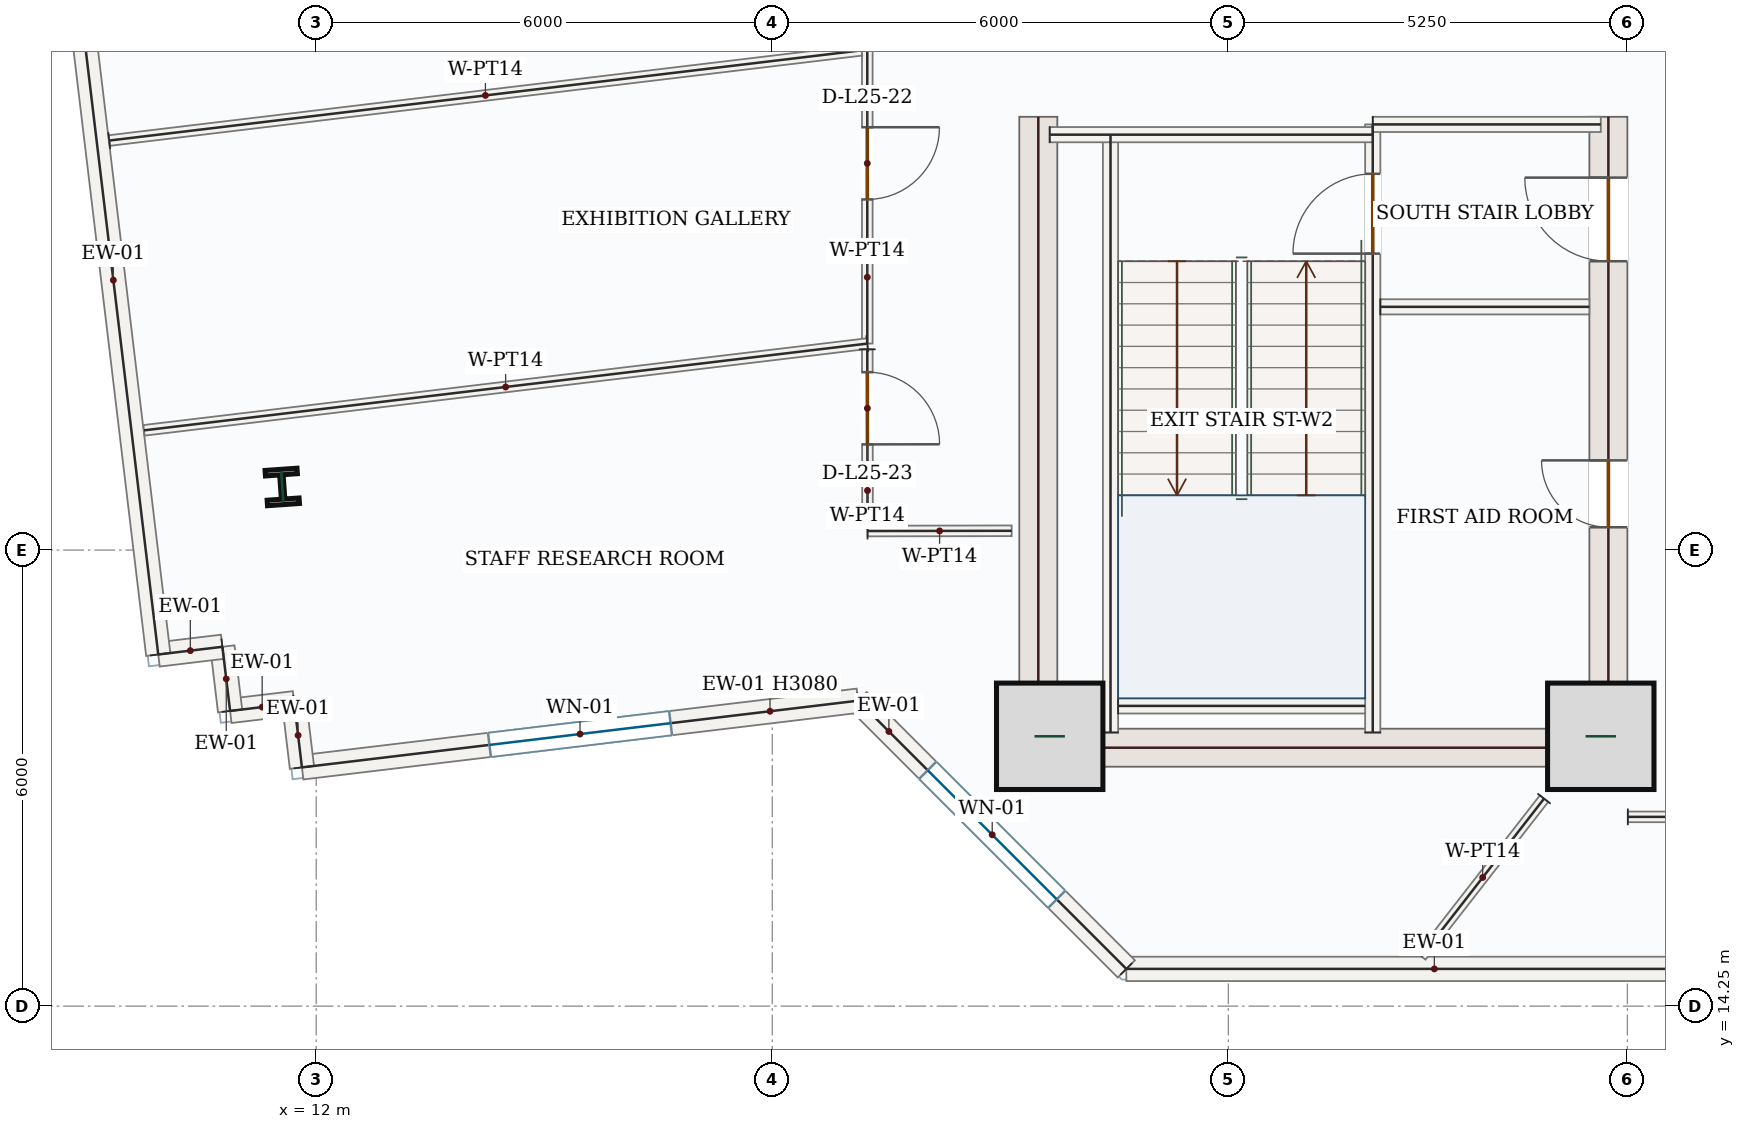
"""IFC4 building model, lengths in metres.
Left out: names, types, materials, properties, quantities, classifications, styles, units other than length and angle.
Written with IfcOpenShell. Run it as: python <this file> out.ifc"""

import sys

from ifc_helpers import new_model, si_unit, direction, frame, frame_2d, origin, origin_2d, place, context, subcontext, project, spatial, rectangle, i_section, extrude, source, transform, mapped, element, fill, save


model = new_model("IFC4")
c1 = context("Model", 3, precision=1e-05, world=origin(), true_north=direction((0.0, 1.0)))
c2 = subcontext(c1, "Body", "Model", "MODEL_VIEW")
j1 = project(units=[si_unit("LENGTHUNIT", "METRE"), si_unit("PLANEANGLEUNIT", "RADIAN")], contexts=[c1])
p1 = place(None, origin())
s1 = spatial("IfcSite", under=j1, at=p1, CompositionType="ELEMENT")
p2 = place(p1, origin())
s2 = spatial("IfcBuilding", under=s1, at=p2, CompositionType="ELEMENT")
p3 = place(p2, frame((0.0, 0.0, 113.1)))
s3 = spatial("IfcBuildingStorey", under=s2, at=p3, CompositionType="ELEMENT", Elevation=113.1)
m1 = source(origin(), c2, "Body", "SweptSolid", [
    extrude(rectangle(XDim=8.55, YDim=0.5, at=frame_2d((4.275, 0.0))), origin(), (0.0, 0.0, 1.0), 3.95),
])
p4 = place(p3, frame((21.5, 17.4, 0.0), z_axis=(0.0, 0.0, 1.0), x_axis=(0.0, 1.0, 0.0)))
e1 = element("IfcWall", 1, at=p4, inside=s3, PredefinedType="SHEAR", context=c2, shape_type="MappedRepresentation", body=[
    mapped(m1, transform((0.0, 0.0, 0.0), x_axis=(1.0, 0.0, 0.0), y_axis=(0.0, 1.0, 0.0), z_axis=(0.0, 0.0, 1.0), scale=1.0)),
])
p5 = place(p3, frame((29.0, 17.4, 0.0), z_axis=(0.0, 0.0, 1.0), x_axis=(0.0, 1.0, 0.0)))
e2 = element("IfcWall", 2, at=p5, inside=s3, PredefinedType="SHEAR", context=c2, shape_type="SweptSolid", body=[
    extrude(rectangle(XDim=8.55, YDim=0.5, at=frame_2d((4.275, 0.0))), origin(), (0.0, 0.0, 1.0), 3.95),
])
p6 = place(p5, frame((6.65, 0.0, 0.0)))
e3 = element("IfcOpeningElement", 3, at=p6, cuts=e2, PredefinedType="OPENING", context=c2, shape_type="SweptSolid", body=[
    extrude(rectangle(XDim=1.1, YDim=2.2, at=frame_2d((0.55, 1.1))), frame((0.0, 0.26, 0.0), z_axis=(0.0, -1.0, 0.0), x_axis=(1.0, 0.0, 0.0)), (0.0, 0.0, 1.0), 0.52),
])
p7 = place(p5, frame((3.15, 0.0, 0.0)))
e4 = element("IfcOpeningElement", 4, at=p7, cuts=e2, PredefinedType="OPENING", context=c2, shape_type="SweptSolid", body=[
    extrude(rectangle(XDim=0.88, YDim=2.1, at=frame_2d((0.44, 1.05))), frame((0.0, 0.26, 0.0), z_axis=(0.0, -1.0, 0.0), x_axis=(1.0, 0.0, 0.0)), (0.0, 0.0, 1.0), 0.52),
])
m2 = source(origin(), c2, "Body", "SweptSolid", [
    extrude(rectangle(XDim=7.0, YDim=0.5, at=frame_2d((3.5, 0.0))), origin(), (0.0, 0.0, 1.0), 3.95),
])
p8 = place(p3, frame((21.75, 17.65, 0.0), z_axis=(0.0, 0.0, 1.0), x_axis=(1.0, 0.0, 0.0)))
e5 = element("IfcWall", 5, at=p8, inside=s3, PredefinedType="SHEAR", context=c2, shape_type="MappedRepresentation", body=[
    mapped(m2, transform((0.0, 0.0, 0.0), x_axis=(1.0, 0.0, 0.0), y_axis=(0.0, 1.0, 0.0), z_axis=(0.0, 0.0, 1.0), scale=1.0)),
])
m3 = source(origin(), c2, "Body", "SweptSolid", [
    extrude(rectangle(XDim=1.4, YDim=1.4, at=origin_2d()), origin(), (0.0, 0.0, 1.0), 4.2),
])
for number, where, z_axis, x_axis in (
    (6, (21.65, 17.8, 0.0), (0.0, 0.0, 1.0), (1.0, 0.0, 0.0)),
    (7, (28.9, 17.8, 0.0), (0.0, 0.0, 1.0), (1.0, 0.0, 0.0)),
):
    element("IfcColumn", number, at=place(p3, frame(where, z_axis=z_axis, x_axis=x_axis)), inside=s3, PredefinedType="COLUMN", context=c2, shape_type="MappedRepresentation", body=[
        mapped(m3, transform((0.0, 0.0, 0.0), x_axis=(1.0, 0.0, 0.0), y_axis=(0.0, 1.0, 0.0), z_axis=(0.0, 0.0, 1.0), scale=1.0)),
    ])
m4 = source(origin(), c2, "Body", "SweptSolid", [
    extrude(i_section(OverallWidth=0.421, OverallDepth=0.465, WebThickness=0.045, FlangeThickness=0.073, FilletRadius=0.018, at=origin_2d()), origin(), (0.0, 0.0, 1.0), 4.2),
])
p9 = place(p3, frame((11.553, 21.08, 0.0), z_axis=(0.0, 0.0, 1.0), x_axis=(0.99756405026, 0.069756473744, 0.0)))
e8 = element("IfcColumn", 8, at=p9, inside=s3, PredefinedType="COLUMN", context=c2, shape_type="MappedRepresentation", body=[
    mapped(m4, transform((0.0, 0.0, 0.0), x_axis=(1.0, 0.0, 0.0), y_axis=(0.0, 1.0, 0.0), z_axis=(0.0, 0.0, 1.0), scale=1.0)),
])
m5 = source(origin(), c2, "Body", "SweptSolid", [
    extrude(rectangle(XDim=8.105, YDim=0.32, at=frame_2d((4.052, 0.0))), origin(), (0.0, 0.0, 1.0), 3.95),
])
p10 = place(p3, frame((30.763, 14.74, 0.0), z_axis=(0.0, 0.0, 1.0), x_axis=(-1.0, 0.0, 0.0)))
e9 = element("IfcWall", 9, at=p10, inside=s3, PredefinedType="SOLIDWALL", context=c2, shape_type="MappedRepresentation", body=[
    mapped(m5, transform((0.0, 0.0, 0.0), x_axis=(1.0, 0.0, 0.0), y_axis=(0.0, 1.0, 0.0), z_axis=(0.0, 0.0, 1.0), scale=1.0)),
])
p11 = place(p3, frame((22.658, 14.74, 0.0), z_axis=(0.0, 0.0, 1.0), x_axis=(-0.707106781187, 0.707106781187, 0.0)))
e10 = element("IfcWall", 10, at=p11, inside=s3, PredefinedType="SOLIDWALL", context=c2, shape_type="SweptSolid", body=[
    extrude(rectangle(XDim=4.99, YDim=0.32, at=frame_2d((2.495, 0.0))), origin(), (0.0, 0.0, 1.0), 3.95),
])
p12 = place(p11, frame((1.295, 0.0, 0.85)))
e11 = element("IfcOpeningElement", 11, at=p12, cuts=e10, PredefinedType="OPENING", context=c2, shape_type="SweptSolid", body=[
    extrude(rectangle(XDim=2.4, YDim=1.8, at=frame_2d((1.2, 0.9))), frame((0.0, 0.17, 0.0), z_axis=(0.0, -1.0, 0.0), x_axis=(1.0, 0.0, 0.0)), (0.0, 0.0, 1.0), 0.34),
])
p13 = place(p3, frame((19.129, 18.269, 0.0), z_axis=(0.0, 0.0, 1.0), x_axis=(-0.992882794037, -0.119095580547, 0.0)))
e12 = element("IfcWall", 12, at=p13, inside=s3, PredefinedType="SOLIDWALL", context=c2, shape_type="SweptSolid", body=[
    extrude(rectangle(XDim=7.37, YDim=0.32, at=frame_2d((3.685, 0.0))), origin(), (0.0, 0.0, 1.0), 3.08),
])
p14 = place(p13, frame((2.485, 0.0, 0.85)))
e13 = element("IfcOpeningElement", 13, at=p14, cuts=e12, PredefinedType="OPENING", context=c2, shape_type="SweptSolid", body=[
    extrude(rectangle(XDim=2.4, YDim=1.8, at=frame_2d((1.2, 0.9))), frame((0.0, 0.17, 0.0), z_axis=(0.0, -1.0, 0.0), x_axis=(1.0, 0.0, 0.0)), (0.0, 0.0, 1.0), 0.34),
])
m6 = source(origin(), c2, "Body", "SweptSolid", [
    extrude(rectangle(XDim=0.85, YDim=0.32, at=frame_2d((0.425, 0.0))), origin(), (0.0, 0.0, 1.0), 3.95),
])
for number, where, z_axis, x_axis in (
    (14, (11.812, 17.391, 0.0), (0.0, 0.0, 1.0), (-0.119, 0.993, 0.0)),
    (15, (11.711, 18.235, 0.0), (0.0, 0.0, 1.0), (-0.993, -0.119, 0.0)),
):
    element("IfcWall", number, at=place(p3, frame(where, z_axis=z_axis, x_axis=x_axis)), inside=s3, PredefinedType="SOLIDWALL", context=c2, shape_type="MappedRepresentation", body=[
        mapped(m6, transform((0.0, 0.0, 0.0), x_axis=(1.0, 0.0, 0.0), y_axis=(0.0, 1.0, 0.0), z_axis=(0.0, 0.0, 1.0), scale=1.0)),
    ])
m7 = source(origin(), c2, "Body", "SweptSolid", [
    extrude(rectangle(XDim=0.85, YDim=0.32, at=frame_2d((0.425, 0.0))), origin(), (0.0, 0.0, 1.0), 3.95),
])
p15 = place(p3, frame((10.867, 18.134, 0.0), z_axis=(0.0, 0.0, 1.0), x_axis=(-0.11894130009, 0.992901287708, 0.0)))
e16 = element("IfcWall", 16, at=p15, inside=s3, PredefinedType="SOLIDWALL", context=c2, shape_type="MappedRepresentation", body=[
    mapped(m7, transform((0.0, 0.0, 0.0), x_axis=(1.0, 0.0, 0.0), y_axis=(0.0, 1.0, 0.0), z_axis=(0.0, 0.0, 1.0), scale=1.0)),
])
p16 = place(p3, frame((10.766, 18.978, 0.0), z_axis=(0.0, 0.0, 1.0), x_axis=(-0.992905350382, -0.118907380694, 0.0)))
e17 = element("IfcWall", 17, at=p16, inside=s3, PredefinedType="SOLIDWALL", context=c2, shape_type="MappedRepresentation", body=[
    mapped(m6, transform((0.0, 0.0, 0.0), x_axis=(1.0, 0.0, 0.0), y_axis=(0.0, 1.0, 0.0), z_axis=(0.0, 0.0, 1.0), scale=1.0)),
])
m8 = source(origin(), c2, "Body", "SweptSolid", [
    extrude(rectangle(XDim=9.92, YDim=0.32, at=frame_2d((4.96, 0.0))), origin(), (0.0, 0.0, 1.0), 3.95),
])
p17 = place(p3, frame((9.922, 18.876, 0.0), z_axis=(0.0, 0.0, 1.0), x_axis=(-0.119092815244, 0.992883125729, 0.0)))
e18 = element("IfcWall", 18, at=p17, inside=s3, PredefinedType="SOLIDWALL", context=c2, shape_type="MappedRepresentation", body=[
    mapped(m8, transform((0.0, 0.0, 0.0), x_axis=(1.0, 0.0, 0.0), y_axis=(0.0, 1.0, 0.0), z_axis=(0.0, 0.0, 1.0), scale=1.0)),
])
m9 = source(origin(), c2, "Body", "SweptSolid", [
    extrude(rectangle(XDim=7.87, YDim=0.2, at=frame_2d((3.935, 0.0))), origin(), (0.0, 0.0, 1.0), 3.95),
])
p18 = place(p3, frame((22.45, 17.85, 0.0), z_axis=(0.0, 0.0, 1.0), x_axis=(0.0, 1.0, 0.0)))
e19 = element("IfcWall", 19, at=p18, inside=s3, PredefinedType="SOLIDWALL", context=c2, shape_type="MappedRepresentation", body=[
    mapped(m9, transform((0.0, 0.0, 0.0), x_axis=(1.0, 0.0, 0.0), y_axis=(0.0, 1.0, 0.0), z_axis=(0.0, 0.0, 1.0), scale=1.0)),
])
p19 = place(p3, frame((25.9, 17.85, 0.0), z_axis=(0.0, 0.0, 1.0), x_axis=(0.0, 1.0, 0.0)))
e20 = element("IfcWall", 20, at=p19, inside=s3, PredefinedType="SOLIDWALL", context=c2, shape_type="SweptSolid", body=[
    extrude(rectangle(XDim=8.0, YDim=0.2, at=frame_2d((4.0, 0.0))), origin(), (0.0, 0.0, 1.0), 3.95),
])
p20 = place(p19, frame((6.3, 0.0, 0.0)))
e21 = element("IfcOpeningElement", 21, at=p20, cuts=e20, PredefinedType="OPENING", context=c2, shape_type="SweptSolid", body=[
    extrude(rectangle(XDim=1.05, YDim=2.15, at=frame_2d((0.525, 1.075))), frame((0.0, 0.11, 0.0), z_axis=(0.0, -1.0, 0.0), x_axis=(1.0, 0.0, 0.0)), (0.0, 0.0, 1.0), 0.22),
])
m10 = source(origin(), c2, "Body", "SweptSolid", [
    extrude(rectangle(XDim=4.25, YDim=0.2, at=frame_2d((2.125, 0.0))), origin(), (0.0, 0.0, 1.0), 3.95),
])
p21 = place(p3, frame((21.65, 25.715, 0.0), z_axis=(0.0, 0.0, 1.0), x_axis=(1.0, 0.0, 0.0)))
e22 = element("IfcWall", 22, at=p21, inside=s3, PredefinedType="SOLIDWALL", context=c2, shape_type="MappedRepresentation", body=[
    mapped(m10, transform((0.0, 0.0, 0.0), x_axis=(1.0, 0.0, 0.0), y_axis=(0.0, 1.0, 0.0), z_axis=(0.0, 0.0, 1.0), scale=1.0)),
])
m11 = source(origin(), c2, "Body", "SweptSolid", [
    extrude(rectangle(XDim=3.0, YDim=0.2, at=frame_2d((1.5, 0.0))), origin(), (0.0, 0.0, 1.0), 3.95),
])
p22 = place(p3, frame((25.9, 25.85, 0.0), z_axis=(0.0, 0.0, 1.0), x_axis=(1.0, 0.0, 0.0)))
e23 = element("IfcWall", 23, at=p22, inside=s3, PredefinedType="SOLIDWALL", context=c2, shape_type="MappedRepresentation", body=[
    mapped(m11, transform((0.0, 0.0, 0.0), x_axis=(1.0, 0.0, 0.0), y_axis=(0.0, 1.0, 0.0), z_axis=(0.0, 0.0, 1.0), scale=1.0)),
])
m12 = source(origin(), c2, "Body", "SweptSolid", [
    extrude(rectangle(XDim=3.25, YDim=0.2, at=frame_2d((1.625, 0.0))), origin(), (0.0, 0.0, 1.0), 3.95),
])
p23 = place(p3, frame((22.55, 18.2, 0.0), z_axis=(0.0, 0.0, 1.0), x_axis=(1.0, 0.0, 0.0)))
e24 = element("IfcWall", 24, at=p23, inside=s3, PredefinedType="SOLIDWALL", context=c2, shape_type="MappedRepresentation", body=[
    mapped(m12, transform((0.0, 0.0, 0.0), x_axis=(1.0, 0.0, 0.0), y_axis=(0.0, 1.0, 0.0), z_axis=(0.0, 0.0, 1.0), scale=1.0)),
])
m13 = source(origin(), c2, "Body", "SweptSolid", [
    extrude(rectangle(XDim=2.75, YDim=0.2, at=frame_2d((1.375, 0.0))), origin(), (0.0, 0.0, 1.0), 3.95),
])
p24 = place(p3, frame((26.0, 23.45, 0.0), z_axis=(0.0, 0.0, 1.0), x_axis=(1.0, 0.0, 0.0)))
e25 = element("IfcWall", 25, at=p24, inside=s3, PredefinedType="SOLIDWALL", context=c2, shape_type="MappedRepresentation", body=[
    mapped(m13, transform((0.0, 0.0, 0.0), x_axis=(1.0, 0.0, 0.0), y_axis=(0.0, 1.0, 0.0), z_axis=(0.0, 0.0, 1.0), scale=1.0)),
])
p25 = place(p3, frame((19.25, 26.834, 0.0), z_axis=(0.0, 0.0, 1.0), x_axis=(0.0, -1.0, 0.0)))
e26 = element("IfcWall", 26, at=p25, inside=s3, PredefinedType="PARTITIONING", context=c2, shape_type="SweptSolid", body=[
    extrude(rectangle(XDim=3.868, YDim=0.14, at=frame_2d((1.934, 0.0))), origin(), (0.0, 0.0, 1.0), 3.95),
])
p26 = place(p25, frame((1.021, 0.0, 0.0)))
e27 = element("IfcOpeningElement", 27, at=p26, cuts=e26, PredefinedType="OPENING", context=c2, shape_type="SweptSolid", body=[
    extrude(rectangle(XDim=0.95, YDim=2.15, at=frame_2d((0.475, 1.075))), frame((0.0, 0.08, 0.0), z_axis=(0.0, -1.0, 0.0), x_axis=(1.0, 0.0, 0.0)), (0.0, 0.0, 1.0), 0.16),
])
m14 = source(origin(), c2, "Body", "SweptSolid", [
    extrude(rectangle(XDim=9.584, YDim=0.14, at=frame_2d((4.792, 0.0))), origin(), (0.0, 0.0, 1.0), 3.95),
])
p27 = place(p3, frame((19.25, 22.966, 0.0), z_axis=(0.0, 0.0, 1.0), x_axis=(-0.992883225705, -0.119091981737, 0.0)))
e28 = element("IfcWall", 28, at=p27, inside=s3, PredefinedType="PARTITIONING", context=c2, shape_type="MappedRepresentation", body=[
    mapped(m14, transform((0.0, 0.0, 0.0), x_axis=(1.0, 0.0, 0.0), y_axis=(0.0, 1.0, 0.0), z_axis=(0.0, 0.0, 1.0), scale=1.0)),
])
m15 = source(origin(), c2, "Body", "SweptSolid", [
    extrude(rectangle(XDim=9.969, YDim=0.14, at=frame_2d((4.984, 0.0))), origin(), (0.0, 0.0, 1.0), 3.95),
])
p28 = place(p3, frame((9.277, 25.638, 0.0), z_axis=(0.0, 0.0, 1.0), x_axis=(0.992882747367, 0.119095969623, 0.0)))
e29 = element("IfcWall", 29, at=p28, inside=s3, PredefinedType="PARTITIONING", context=c2, shape_type="MappedRepresentation", body=[
    mapped(m15, transform((0.0, 0.0, 0.0), x_axis=(1.0, 0.0, 0.0), y_axis=(0.0, 1.0, 0.0), z_axis=(0.0, 0.0, 1.0), scale=1.0)),
])
m16 = source(origin(), c2, "Body", "SweptSolid", [
    extrude(rectangle(XDim=1.896, YDim=0.14, at=frame_2d((0.948, 0.0))), origin(), (0.0, 0.0, 1.0), 3.95),
])
p29 = place(p3, frame((19.253, 20.5, 0.0), z_axis=(0.0, 0.0, 1.0), x_axis=(0.999998598926, 0.001673961085, 0.0)))
e30 = element("IfcWall", 30, at=p29, inside=s3, PredefinedType="PARTITIONING", context=c2, shape_type="MappedRepresentation", body=[
    mapped(m16, transform((0.0, 0.0, 0.0), x_axis=(1.0, 0.0, 0.0), y_axis=(0.0, 1.0, 0.0), z_axis=(0.0, 0.0, 1.0), scale=1.0)),
])
m17 = source(origin(), c2, "Body", "SweptSolid", [
    extrude(rectangle(XDim=2.629, YDim=0.14, at=frame_2d((1.315, 0.0))), origin(), (0.0, 0.0, 1.0), 3.95),
])
p30 = place(p3, frame((28.154, 16.98, 0.0), z_axis=(0.0, 0.0, 1.0), x_axis=(-0.614210560268, -0.789142184689, 0.0)))
e31 = element("IfcWall", 31, at=p30, inside=s3, PredefinedType="PARTITIONING", context=c2, shape_type="MappedRepresentation", body=[
    mapped(m17, transform((0.0, 0.0, 0.0), x_axis=(1.0, 0.0, 0.0), y_axis=(0.0, 1.0, 0.0), z_axis=(0.0, 0.0, 1.0), scale=1.0)),
])
p31 = place(p3, frame((19.25, 22.891, 0.0), z_axis=(0.0, 0.0, 1.0), x_axis=(0.001476168784, -0.999998910462, 0.0)))
e32 = element("IfcWall", 32, at=p31, inside=s3, PredefinedType="PARTITIONING", context=c2, shape_type="SweptSolid", body=[
    extrude(rectangle(XDim=2.315, YDim=0.14, at=frame_2d((1.158, 0.0))), origin(), (0.0, 0.0, 1.0), 3.95),
])
p32 = place(p31, frame((0.3, 0.0, 0.0)))
e33 = element("IfcOpeningElement", 33, at=p32, cuts=e32, PredefinedType="OPENING", context=c2, shape_type="SweptSolid", body=[
    extrude(rectangle(XDim=0.95, YDim=2.15, at=frame_2d((0.475, 1.075))), frame((0.0, 0.08, 0.0), z_axis=(0.0, -1.0, 0.0), x_axis=(1.0, 0.0, 0.0)), (0.0, 0.0, 1.0), 0.16),
])
p33 = place(p3, frame((29.256, 16.74, 0.0), z_axis=(0.0, 0.0, 1.0), x_axis=(1.0, 0.0, 0.0)))
e34 = element("IfcWall", 34, at=p33, inside=s3, PredefinedType="PARTITIONING", context=c2, shape_type="SweptSolid", body=[
    extrude(rectangle(XDim=13.488, YDim=0.14, at=frame_2d((6.744, 0.0))), origin(), (0.0, 0.0, 1.0), 3.95),
])
p34 = place(p33, frame((6.269, 0.0, 0.0)))
e35 = element("IfcOpeningElement", 35, at=p34, cuts=e34, PredefinedType="OPENING", context=c2, shape_type="SweptSolid", body=[
    extrude(rectangle(XDim=0.95, YDim=2.15, at=frame_2d((0.475, 1.075))), frame((0.0, 0.08, 0.0), z_axis=(0.0, -1.0, 0.0), x_axis=(1.0, 0.0, 0.0)), (0.0, 0.0, 1.0), 0.16),
])
m18 = source(origin(), c2, "Body", "SweptSolid", [
    extrude(rectangle(XDim=2.4, YDim=1.8, at=frame_2d((1.2, 0.9))), frame((0.0, 0.03, 0.0), z_axis=(0.0, -1.0, 0.0), x_axis=(1.0, 0.0, 0.0)), (0.0, 0.0, 1.0), 0.06),
])
p35 = place(p12, origin())
e36 = element("IfcWindow", 36, at=p35, inside=s3, PartitioningType="DOUBLE_PANEL_VERTICAL", PredefinedType="WINDOW", context=c2, shape_type="MappedRepresentation", body=[
    mapped(m18, transform((0.0, 0.0, 0.0), x_axis=(1.0, 0.0, 0.0), y_axis=(0.0, 1.0, 0.0), z_axis=(0.0, 0.0, 1.0), scale=1.0)),
])
fill(e11, e36)
p36 = place(p14, origin())
e37 = element("IfcWindow", 37, at=p36, inside=s3, PartitioningType="DOUBLE_PANEL_VERTICAL", PredefinedType="WINDOW", context=c2, shape_type="MappedRepresentation", body=[
    mapped(m18, transform((0.0, 0.0, 0.0), x_axis=(1.0, 0.0, 0.0), y_axis=(0.0, 1.0, 0.0), z_axis=(0.0, 0.0, 1.0), scale=1.0)),
])
fill(e13, e37)
m19 = source(origin(), c2, "Body", "SweptSolid", [
    extrude(rectangle(XDim=1.05, YDim=2.15, at=frame_2d((0.525, 1.075))), frame((0.0, 0.025, 0.0), z_axis=(0.0, -1.0, 0.0), x_axis=(1.0, 0.0, 0.0)), (0.0, 0.0, 1.0), 0.05),
])
p37 = place(p20, origin())
e38 = element("IfcDoor", 38, at=p37, inside=s3, OperationType="SINGLE_SWING_LEFT", PredefinedType="DOOR", context=c2, shape_type="MappedRepresentation", body=[
    mapped(m19, transform((0.0, 0.0, 0.0), x_axis=(1.0, 0.0, 0.0), y_axis=(0.0, 1.0, 0.0), z_axis=(0.0, 0.0, 1.0), scale=1.0)),
])
fill(e21, e38)
m20 = source(origin(), c2, "Body", "SweptSolid", [
    extrude(rectangle(XDim=1.1, YDim=2.2, at=frame_2d((0.55, 1.1))), frame((0.0, 0.025, 0.0), z_axis=(0.0, -1.0, 0.0), x_axis=(1.0, 0.0, 0.0)), (0.0, 0.0, 1.0), 0.05),
])
p38 = place(p6, origin())
e39 = element("IfcDoor", 39, at=p38, inside=s3, OperationType="SINGLE_SWING_RIGHT", PredefinedType="DOOR", context=c2, shape_type="MappedRepresentation", body=[
    mapped(m20, transform((0.0, 0.0, 0.0), x_axis=(1.0, 0.0, 0.0), y_axis=(0.0, 1.0, 0.0), z_axis=(0.0, 0.0, 1.0), scale=1.0)),
])
fill(e3, e39)
m21 = source(origin(), c2, "Body", "SweptSolid", [
    extrude(rectangle(XDim=0.88, YDim=2.1, at=frame_2d((0.44, 1.05))), frame((0.0, 0.025, 0.0), z_axis=(0.0, -1.0, 0.0), x_axis=(1.0, 0.0, 0.0)), (0.0, 0.0, 1.0), 0.05),
])
p39 = place(p7, origin())
e40 = element("IfcDoor", 40, at=p39, inside=s3, OperationType="SINGLE_SWING_RIGHT", PredefinedType="DOOR", context=c2, shape_type="MappedRepresentation", body=[
    mapped(m21, transform((0.0, 0.0, 0.0), x_axis=(1.0, 0.0, 0.0), y_axis=(0.0, 1.0, 0.0), z_axis=(0.0, 0.0, 1.0), scale=1.0)),
])
fill(e4, e40)
m22 = source(origin(), c2, "Body", "SweptSolid", [
    extrude(rectangle(XDim=0.95, YDim=2.15, at=frame_2d((0.475, 1.075))), frame((0.0, 0.025, 0.0), z_axis=(0.0, -1.0, 0.0), x_axis=(1.0, 0.0, 0.0)), (0.0, 0.0, 1.0), 0.05),
])
p40 = place(p26, origin())
e41 = element("IfcDoor", 41, at=p40, inside=s3, OperationType="SINGLE_SWING_LEFT", PredefinedType="DOOR", context=c2, shape_type="MappedRepresentation", body=[
    mapped(m22, transform((0.0, 0.0, 0.0), x_axis=(1.0, 0.0, 0.0), y_axis=(0.0, 1.0, 0.0), z_axis=(0.0, 0.0, 1.0), scale=1.0)),
])
fill(e27, e41)
p41 = place(p32, origin())
e42 = element("IfcDoor", 42, at=p41, inside=s3, OperationType="SINGLE_SWING_RIGHT", PredefinedType="DOOR", context=c2, shape_type="MappedRepresentation", body=[
    mapped(m22, transform((0.0, 0.0, 0.0), x_axis=(1.0, 0.0, 0.0), y_axis=(0.0, 1.0, 0.0), z_axis=(0.0, 0.0, 1.0), scale=1.0)),
])
fill(e33, e42)
save(model, sys.argv[1])
